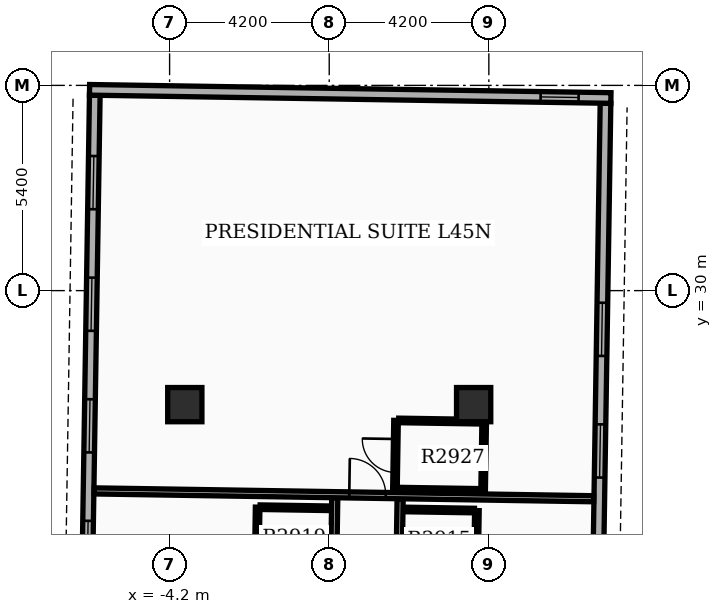
"""IFC4 building model, lengths in metres.
Left out: names, types, materials, properties, quantities, classifications, styles, units other than length and angle.
Written with IfcOpenShell. Run it as: python <this file> out.ifc"""

import sys

from ifc_helpers import new_model, si_unit, direction, frame, frame_2d, origin, origin_2d, place, context, subcontext, project, spatial, rectangle, extrude, element, fill, save


model = new_model("IFC4")
c1 = context("Model", 3, precision=1e-05, world=origin(), true_north=direction((0.0, 1.0)))
c2 = subcontext(c1, "Body", "Model", "MODEL_VIEW")
j1 = project(units=[si_unit("LENGTHUNIT", "METRE"), si_unit("PLANEANGLEUNIT", "RADIAN")], contexts=[c1])
p1 = place(None, origin())
s1 = spatial("IfcSite", under=j1, at=p1, CompositionType="ELEMENT")
p2 = place(p1, origin())
s2 = spatial("IfcBuilding", under=s1, at=p2, CompositionType="ELEMENT")
p3 = place(p2, frame((0.0, 0.0, 180.0)))
s3 = spatial("IfcBuildingStorey", under=s2, at=p3, CompositionType="ELEMENT", Elevation=180.0)
for number, where, z_axis, x_axis in (
    (1, (-3.8, 27.0, 0.0), (0.0, 0.0, 1.0), (1.0, 0.0, 0.0)),
    (2, (3.8, 27.0, 0.0), (0.0, 0.0, 1.0), (1.0, 0.0, 0.0)),
):
    element("IfcColumn", number, at=place(p3, frame(where, z_axis=z_axis, x_axis=x_axis)), inside=s3, PredefinedType="COLUMN", context=c2, shape_type="SweptSolid", body=[
        extrude(rectangle(XDim=0.9, YDim=0.9, at=origin_2d()), origin(), (0.0, 0.0, 1.0), 3.9),
    ])
p4 = place(p3, frame((6.954, 14.833, 0.0), z_axis=(0.0, 0.0, 1.0), x_axis=(0.015705059908, 0.999876667941, 0.0)))
e3 = element("IfcWall", 3, at=p4, inside=s3, PredefinedType="STANDARD", context=c2, shape_type="SweptSolid", body=[
    extrude(rectangle(XDim=20.1, YDim=0.28, at=frame_2d((10.05, 0.0))), origin(), (0.0, 0.0, 1.0), 2.97),
])
p5 = place(p4, frame((1.6, 0.0, 0.8)))
e4 = element("IfcOpeningElement", 4, at=p5, cuts=e3, PredefinedType="OPENING", context=c2, shape_type="SweptSolid", body=[
    extrude(rectangle(XDim=1.4, YDim=1.6, at=frame_2d((0.7, 0.8))), frame((0.0, 0.15, 0.0), z_axis=(0.0, -1.0, 0.0), x_axis=(1.0, 0.0, 0.0)), (0.0, 0.0, 1.0), 0.3),
])
p6 = place(p4, frame((6.55, 0.0, 0.8)))
e5 = element("IfcOpeningElement", 5, at=p6, cuts=e3, PredefinedType="OPENING", context=c2, shape_type="SweptSolid", body=[
    extrude(rectangle(XDim=1.4, YDim=1.6, at=frame_2d((0.7, 0.8))), frame((0.0, 0.15, 0.0), z_axis=(0.0, -1.0, 0.0), x_axis=(1.0, 0.0, 0.0)), (0.0, 0.0, 1.0), 0.3),
])
p7 = place(p4, frame((10.25, 0.0, 0.8)))
e6 = element("IfcOpeningElement", 6, at=p7, cuts=e3, PredefinedType="OPENING", context=c2, shape_type="SweptSolid", body=[
    extrude(rectangle(XDim=1.4, YDim=1.6, at=frame_2d((0.7, 0.8))), frame((0.0, 0.15, 0.0), z_axis=(0.0, -1.0, 0.0), x_axis=(1.0, 0.0, 0.0)), (0.0, 0.0, 1.0), 0.3),
])
p8 = place(p4, frame((13.45, 0.0, 0.8)))
e7 = element("IfcOpeningElement", 7, at=p8, cuts=e3, PredefinedType="OPENING", context=c2, shape_type="SweptSolid", body=[
    extrude(rectangle(XDim=1.4, YDim=1.6, at=frame_2d((0.7, 0.8))), frame((0.0, 0.15, 0.0), z_axis=(0.0, -1.0, 0.0), x_axis=(1.0, 0.0, 0.0)), (0.0, 0.0, 1.0), 0.3),
])
p9 = place(p3, frame((-6.169, 35.141, 0.0), z_axis=(0.0, 0.0, 1.0), x_axis=(-0.01571739401, -0.999876474133, 0.0)))
e8 = element("IfcWall", 8, at=p9, inside=s3, PredefinedType="STANDARD", context=c2, shape_type="SweptSolid", body=[
    extrude(rectangle(XDim=20.1, YDim=0.28, at=frame_2d((10.05, 0.0))), origin(), (0.0, 0.0, 1.0), 2.97),
])
p10 = place(p9, frame((1.6, 0.0, 0.8)))
e9 = element("IfcOpeningElement", 9, at=p10, cuts=e8, PredefinedType="OPENING", context=c2, shape_type="SweptSolid", body=[
    extrude(rectangle(XDim=1.4, YDim=1.6, at=frame_2d((0.7, 0.8))), frame((0.0, 0.15, 0.0), z_axis=(0.0, -1.0, 0.0), x_axis=(1.0, 0.0, 0.0)), (0.0, 0.0, 1.0), 0.3),
])
p11 = place(p9, frame((4.8, 0.0, 0.8)))
e10 = element("IfcOpeningElement", 10, at=p11, cuts=e8, PredefinedType="OPENING", context=c2, shape_type="SweptSolid", body=[
    extrude(rectangle(XDim=1.4, YDim=1.6, at=frame_2d((0.7, 0.8))), frame((0.0, 0.15, 0.0), z_axis=(0.0, -1.0, 0.0), x_axis=(1.0, 0.0, 0.0)), (0.0, 0.0, 1.0), 0.3),
])
p12 = place(p9, frame((8.0, 0.0, 0.8)))
e11 = element("IfcOpeningElement", 11, at=p12, cuts=e8, PredefinedType="OPENING", context=c2, shape_type="SweptSolid", body=[
    extrude(rectangle(XDim=1.4, YDim=1.6, at=frame_2d((0.7, 0.8))), frame((0.0, 0.15, 0.0), z_axis=(0.0, -1.0, 0.0), x_axis=(1.0, 0.0, 0.0)), (0.0, 0.0, 1.0), 0.3),
])
p13 = place(p9, frame((11.2, 0.0, 0.8)))
e12 = element("IfcOpeningElement", 12, at=p13, cuts=e8, PredefinedType="OPENING", context=c2, shape_type="SweptSolid", body=[
    extrude(rectangle(XDim=1.4, YDim=1.6, at=frame_2d((0.7, 0.8))), frame((0.0, 0.15, 0.0), z_axis=(0.0, -1.0, 0.0), x_axis=(1.0, 0.0, 0.0)), (0.0, 0.0, 1.0), 0.3),
])
p14 = place(p9, frame((14.799, 0.0, 0.85)))
e13 = element("IfcOpeningElement", 13, at=p14, cuts=e8, PredefinedType="OPENING", context=c2, shape_type="SweptSolid", body=[
    extrude(rectangle(XDim=1.2, YDim=1.6, at=frame_2d((0.6, 0.8))), frame((0.0, 0.15, 0.0), z_axis=(0.0, -1.0, 0.0), x_axis=(1.0, 0.0, 0.0)), (0.0, 0.0, 1.0), 0.3),
])
p15 = place(p3, frame((7.412, 35.068, 0.0), z_axis=(0.0, 0.0, 1.0), x_axis=(-0.999876549481, 0.015712599986, 0.0)))
e14 = element("IfcWall", 14, at=p15, inside=s3, PredefinedType="STANDARD", context=c2, shape_type="SweptSolid", body=[
    extrude(rectangle(XDim=13.72, YDim=0.28, at=frame_2d((6.86, 0.0))), origin(), (0.0, 0.0, 1.0), 2.97),
])
p16 = place(p15, frame((0.85, 0.0, 0.85)))
e15 = element("IfcOpeningElement", 15, at=p16, cuts=e14, PredefinedType="OPENING", context=c2, shape_type="SweptSolid", body=[
    extrude(rectangle(XDim=1.0, YDim=1.5, at=frame_2d((0.5, 0.75))), frame((0.0, 0.15, 0.0), z_axis=(0.0, -1.0, 0.0), x_axis=(1.0, 0.0, 0.0)), (0.0, 0.0, 1.0), 0.3),
])
p17 = place(p3, frame((1.713, 14.825, 0.0), z_axis=(0.0, 0.0, 1.0), x_axis=(0.015705659641, 0.999876658521, 0.0)))
e16 = element("IfcWall", 16, at=p17, inside=s3, PredefinedType="PARTITIONING", context=c2, shape_type="SweptSolid", body=[
    extrude(rectangle(XDim=9.7, YDim=0.16, at=frame_2d((4.85, 0.0))), origin(), (0.0, 0.0, 1.0), 2.96),
])
p18 = place(p17, frame((2.575, 0.0, 0.0)))
e17 = element("IfcOpeningElement", 17, at=p18, cuts=e16, PredefinedType="OPENING", context=c2, shape_type="SweptSolid", body=[
    extrude(rectangle(XDim=0.96, YDim=2.15, at=frame_2d((0.48, 1.075))), frame((0.0, 0.09, 0.0), z_axis=(0.0, -1.0, 0.0), x_axis=(1.0, 0.0, 0.0)), (0.0, 0.0, 1.0), 0.18),
])
p19 = place(p17, frame((6.467, 0.0, 0.0)))
e18 = element("IfcOpeningElement", 18, at=p19, cuts=e16, PredefinedType="OPENING", context=c2, shape_type="SweptSolid", body=[
    extrude(rectangle(XDim=0.96, YDim=2.15, at=frame_2d((0.48, 1.075))), frame((0.0, 0.09, 0.0), z_axis=(0.0, -1.0, 0.0), x_axis=(1.0, 0.0, 0.0)), (0.0, 0.0, 1.0), 0.18),
])
p20 = place(p3, frame((2.001, 24.242, 0.0), z_axis=(0.0, 0.0, 1.0), x_axis=(0.999874722342, -0.015828443418, 0.0)))
e19 = element("IfcWall", 19, at=p20, inside=s3, PredefinedType="PARTITIONING", context=c2, shape_type="SweptSolid", body=[
    extrude(rectangle(XDim=1.82, YDim=0.12, at=frame_2d((0.91, 0.0))), origin(), (0.0, 0.0, 1.0), 2.96),
])
p21 = place(p3, frame((3.861, 22.612, 0.0), z_axis=(0.0, 0.0, 1.0), x_axis=(0.015716050513, 0.999876495251, 0.0)))
e20 = element("IfcWall", 20, at=p21, inside=s3, PredefinedType="PARTITIONING", context=c2, shape_type="SweptSolid", body=[
    extrude(rectangle(XDim=1.6, YDim=0.12, at=frame_2d((0.8, 0.0))), origin(), (0.0, 0.0, 1.0), 2.96),
])
p22 = place(p3, frame((-0.007, 14.852, 0.0), z_axis=(0.0, 0.0, 1.0), x_axis=(0.015680101899, 0.999877059645, 0.0)))
e21 = element("IfcWall", 21, at=p22, inside=s3, PredefinedType="PARTITIONING", context=c2, shape_type="SweptSolid", body=[
    extrude(rectangle(XDim=9.7, YDim=0.16, at=frame_2d((4.85, 0.0))), origin(), (0.0, 0.0, 1.0), 2.96),
])
p23 = place(p22, frame((0.89, 0.0, 0.0)))
e22 = element("IfcOpeningElement", 22, at=p23, cuts=e21, PredefinedType="OPENING", context=c2, shape_type="SweptSolid", body=[
    extrude(rectangle(XDim=0.96, YDim=2.15, at=frame_2d((0.48, 1.075))), frame((0.0, 0.09, 0.0), z_axis=(0.0, -1.0, 0.0), x_axis=(1.0, 0.0, 0.0)), (0.0, 0.0, 1.0), 0.18),
])
p24 = place(p22, frame((6.467, 0.0, 0.0)))
e23 = element("IfcOpeningElement", 23, at=p24, cuts=e21, PredefinedType="OPENING", context=c2, shape_type="SweptSolid", body=[
    extrude(rectangle(XDim=0.96, YDim=2.15, at=frame_2d((0.48, 1.075))), frame((0.0, 0.09, 0.0), z_axis=(0.0, -1.0, 0.0), x_axis=(1.0, 0.0, 0.0)), (0.0, 0.0, 1.0), 0.18),
])
p25 = place(p3, frame((-1.819, 24.302, 0.0), z_axis=(0.0, 0.0, 1.0), x_axis=(0.999876836305, -0.015694337248, 0.0)))
e24 = element("IfcWall", 24, at=p25, inside=s3, PredefinedType="PARTITIONING", context=c2, shape_type="SweptSolid", body=[
    extrude(rectangle(XDim=1.82, YDim=0.12, at=frame_2d((0.91, 0.0))), origin(), (0.0, 0.0, 1.0), 2.96),
])
p26 = place(p3, frame((-1.909, 22.703, 0.0), z_axis=(0.0, 0.0, 1.0), x_axis=(0.015718448585, 0.999876457556, 0.0)))
e25 = element("IfcWall", 25, at=p26, inside=s3, PredefinedType="PARTITIONING", context=c2, shape_type="SweptSolid", body=[
    extrude(rectangle(XDim=1.6, YDim=0.12, at=frame_2d((0.8, 0.0))), origin(), (0.0, 0.0, 1.0), 2.96),
])
p27 = place(p3, frame((-6.184, 24.73, 0.0), z_axis=(0.0, 0.0, 1.0), x_axis=(0.999876528878, -0.015713911007, 0.0)))
e26 = element("IfcWall", 26, at=p27, inside=s3, PredefinedType="PARTITIONING", context=c2, shape_type="SweptSolid", body=[
    extrude(rectangle(XDim=13.144, YDim=0.16, at=frame_2d((6.572, 0.0))), origin(), (0.0, 0.0, 1.0), 2.96),
])
p28 = place(p27, frame((6.712, 0.0, 0.0)))
e27 = element("IfcOpeningElement", 27, at=p28, cuts=e26, PredefinedType="OPENING", context=c2, shape_type="SweptSolid", body=[
    extrude(rectangle(XDim=0.96, YDim=2.15, at=frame_2d((0.48, 1.075))), frame((0.0, 0.09, 0.0), z_axis=(0.0, -1.0, 0.0), x_axis=(1.0, 0.0, 0.0)), (0.0, 0.0, 1.0), 0.18),
])
p29 = place(p3, frame((1.729, 24.766, 0.0), z_axis=(0.0, 0.0, 1.0), x_axis=(0.015694337248, 0.999876836305, 0.0)))
e28 = element("IfcWall", 28, at=p29, inside=s3, PredefinedType="PARTITIONING", context=c2, shape_type="SweptSolid", body=[
    extrude(rectangle(XDim=1.82, YDim=0.12, at=frame_2d((0.91, 0.0))), origin(), (0.0, 0.0, 1.0), 2.96),
])
p30 = place(p29, frame((0.45, 0.0, 0.0)))
e29 = element("IfcOpeningElement", 29, at=p30, cuts=e28, PredefinedType="OPENING", context=c2, shape_type="SweptSolid", body=[
    extrude(rectangle(XDim=0.88, YDim=2.1, at=frame_2d((0.44, 1.05))), frame((0.0, 0.07, 0.0), z_axis=(0.0, -1.0, 0.0), x_axis=(1.0, 0.0, 0.0)), (0.0, 0.0, 1.0), 0.14),
])
p31 = place(p3, frame((4.049, 24.729, 0.0), z_axis=(0.0, 0.0, 1.0), x_axis=(0.015694337248, 0.999876836305, 0.0)))
e30 = element("IfcWall", 30, at=p31, inside=s3, PredefinedType="PARTITIONING", context=c2, shape_type="SweptSolid", body=[
    extrude(rectangle(XDim=1.82, YDim=0.12, at=frame_2d((0.91, 0.0))), origin(), (0.0, 0.0, 1.0), 2.96),
])
for number, where, z_axis, x_axis in (
    (31, (1.799, 24.765, 0.0), (0.0, 0.0, 1.0), (1.0, -0.016, 0.0)),
    (32, (1.828, 26.585, 0.0), (0.0, 0.0, 1.0), (1.0, -0.016, 0.0)),
):
    element("IfcWall", number, at=place(p3, frame(where, z_axis=z_axis, x_axis=x_axis)), inside=s3, PredefinedType="PARTITIONING", context=c2, shape_type="SweptSolid", body=[
        extrude(rectangle(XDim=2.18, YDim=0.12, at=frame_2d((1.09, 0.0))), origin(), (0.0, 0.0, 1.0), 2.96),
    ])
p32 = place(p7, origin())
e33 = element("IfcWindow", 33, at=p32, inside=s3, PartitioningType="SINGLE_PANEL", PredefinedType="WINDOW", context=c2, shape_type="SweptSolid", body=[
    extrude(rectangle(XDim=1.4, YDim=1.6, at=frame_2d((0.7, 0.8))), frame((0.0, 0.03, 0.0), z_axis=(0.0, -1.0, 0.0), x_axis=(1.0, 0.0, 0.0)), (0.0, 0.0, 1.0), 0.06),
])
fill(e6, e33)
p33 = place(p8, origin())
e34 = element("IfcWindow", 34, at=p33, inside=s3, PartitioningType="SINGLE_PANEL", PredefinedType="WINDOW", context=c2, shape_type="SweptSolid", body=[
    extrude(rectangle(XDim=1.4, YDim=1.6, at=frame_2d((0.7, 0.8))), frame((0.0, 0.03, 0.0), z_axis=(0.0, -1.0, 0.0), x_axis=(1.0, 0.0, 0.0)), (0.0, 0.0, 1.0), 0.06),
])
fill(e7, e34)
p34 = place(p10, origin())
e35 = element("IfcWindow", 35, at=p34, inside=s3, PartitioningType="SINGLE_PANEL", PredefinedType="WINDOW", context=c2, shape_type="SweptSolid", body=[
    extrude(rectangle(XDim=1.4, YDim=1.6, at=frame_2d((0.7, 0.8))), frame((0.0, 0.03, 0.0), z_axis=(0.0, -1.0, 0.0), x_axis=(1.0, 0.0, 0.0)), (0.0, 0.0, 1.0), 0.06),
])
fill(e9, e35)
p35 = place(p11, origin())
e36 = element("IfcWindow", 36, at=p35, inside=s3, PartitioningType="SINGLE_PANEL", PredefinedType="WINDOW", context=c2, shape_type="SweptSolid", body=[
    extrude(rectangle(XDim=1.4, YDim=1.6, at=frame_2d((0.7, 0.8))), frame((0.0, 0.03, 0.0), z_axis=(0.0, -1.0, 0.0), x_axis=(1.0, 0.0, 0.0)), (0.0, 0.0, 1.0), 0.06),
])
fill(e10, e36)
p36 = place(p12, origin())
e37 = element("IfcWindow", 37, at=p36, inside=s3, PartitioningType="SINGLE_PANEL", PredefinedType="WINDOW", context=c2, shape_type="SweptSolid", body=[
    extrude(rectangle(XDim=1.4, YDim=1.6, at=frame_2d((0.7, 0.8))), frame((0.0, 0.03, 0.0), z_axis=(0.0, -1.0, 0.0), x_axis=(1.0, 0.0, 0.0)), (0.0, 0.0, 1.0), 0.06),
])
fill(e11, e37)
p37 = place(p13, origin())
e38 = element("IfcWindow", 38, at=p37, inside=s3, PartitioningType="SINGLE_PANEL", PredefinedType="WINDOW", context=c2, shape_type="SweptSolid", body=[
    extrude(rectangle(XDim=1.4, YDim=1.6, at=frame_2d((0.7, 0.8))), frame((0.0, 0.03, 0.0), z_axis=(0.0, -1.0, 0.0), x_axis=(1.0, 0.0, 0.0)), (0.0, 0.0, 1.0), 0.06),
])
fill(e12, e38)
p38 = place(p16, origin())
e39 = element("IfcWindow", 39, at=p38, inside=s3, PartitioningType="SINGLE_PANEL", PredefinedType="WINDOW", context=c2, shape_type="SweptSolid", body=[
    extrude(rectangle(XDim=1.0, YDim=1.5, at=frame_2d((0.5, 0.75))), frame((0.0, 0.03, 0.0), z_axis=(0.0, -1.0, 0.0), x_axis=(1.0, 0.0, 0.0)), (0.0, 0.0, 1.0), 0.06),
])
fill(e15, e39)
p39 = place(p28, origin())
e40 = element("IfcDoor", 40, at=p39, inside=s3, OperationType="SINGLE_SWING_LEFT", PredefinedType="DOOR", context=c2, shape_type="SweptSolid", body=[
    extrude(rectangle(XDim=0.96, YDim=2.15, at=frame_2d((0.48, 1.075))), frame((0.0, 0.025, 0.0), z_axis=(0.0, -1.0, 0.0), x_axis=(1.0, 0.0, 0.0)), (0.0, 0.0, 1.0), 0.05),
])
fill(e27, e40)
p40 = place(p30, origin())
e41 = element("IfcDoor", 41, at=p40, inside=s3, OperationType="SINGLE_SWING_RIGHT", PredefinedType="DOOR", context=c2, shape_type="SweptSolid", body=[
    extrude(rectangle(XDim=0.88, YDim=2.1, at=frame_2d((0.44, 1.05))), frame((0.0, 0.025, 0.0), z_axis=(0.0, -1.0, 0.0), x_axis=(1.0, 0.0, 0.0)), (0.0, 0.0, 1.0), 0.05),
])
fill(e29, e41)
save(model, sys.argv[1])
